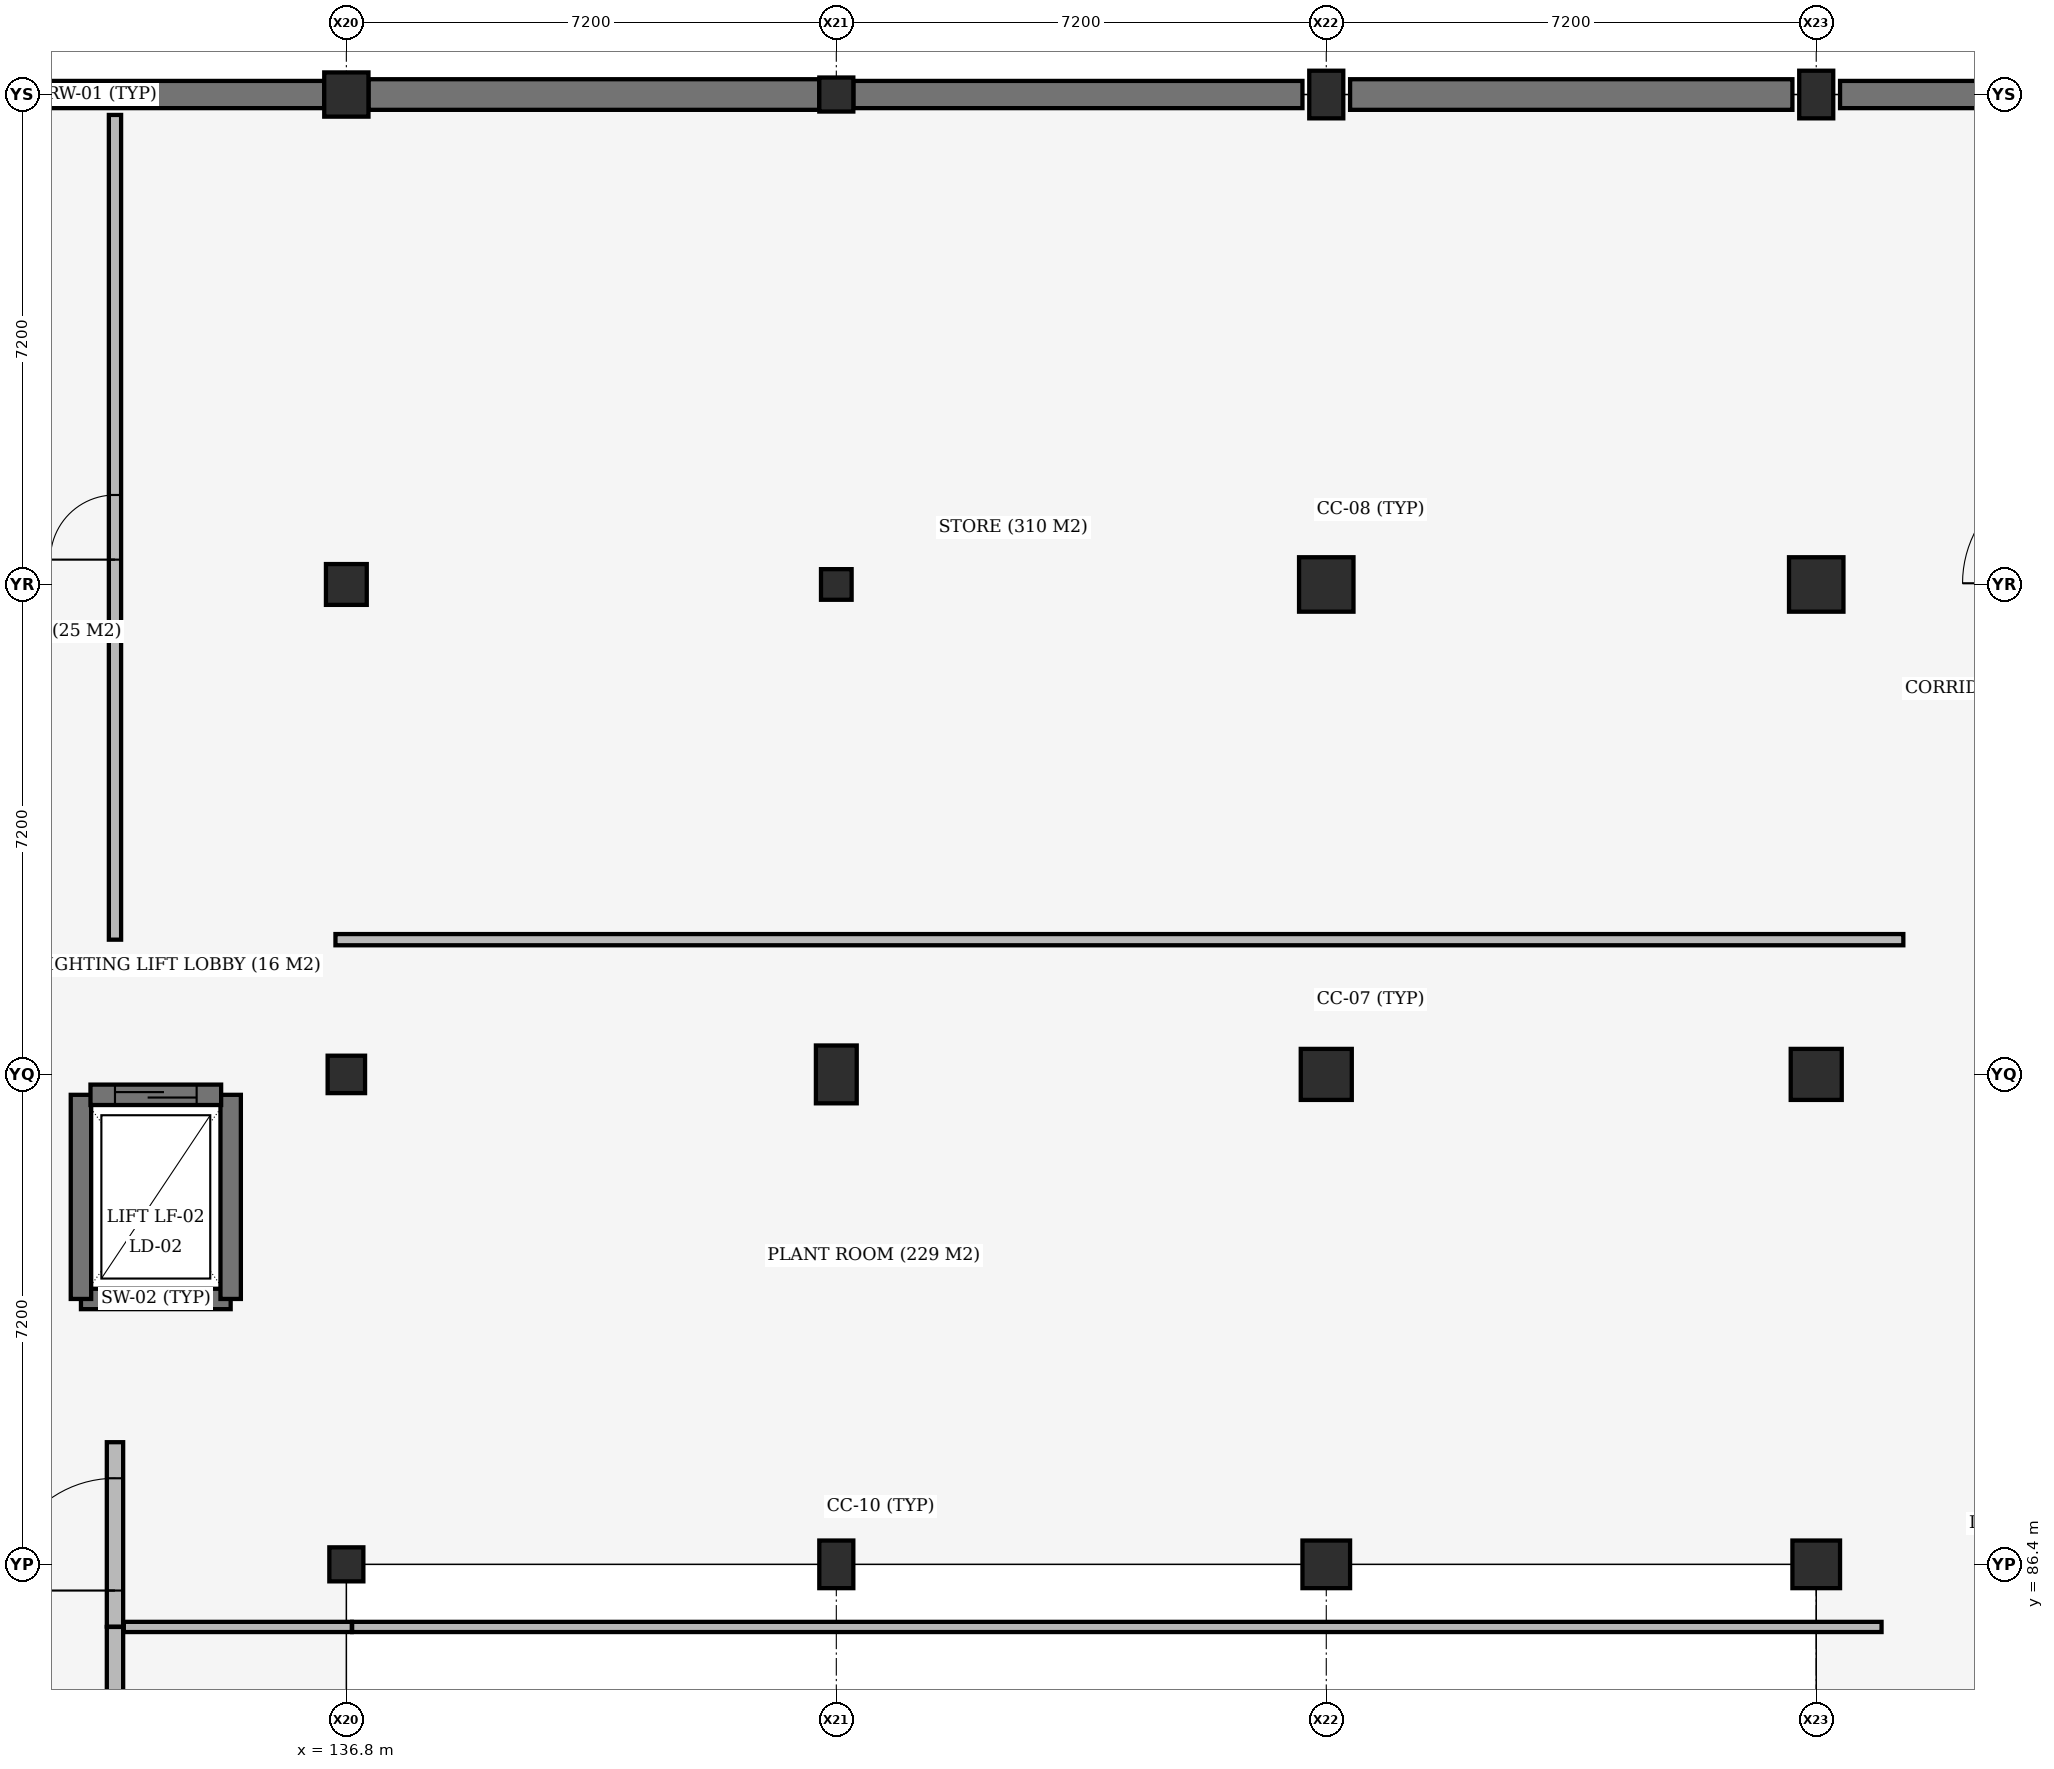
"""IFC4 building model, lengths in metres.
Left out: names, types, materials, properties, quantities, classifications, styles, units other than length and angle.
Written with IfcOpenShell. Run it as: python <this file> out.ifc"""

import sys

from ifc_helpers import new_model, si_unit, direction, frame, frame_2d, origin, origin_2d, place, context, subcontext, project, spatial, rectangle, extrude, element, fill, save


model = new_model("IFC4")
c1 = context("Model", 3, precision=1e-05, world=origin(), true_north=direction((0.0, 1.0)))
c2 = subcontext(c1, "Body", "Model", "MODEL_VIEW")
j1 = project(units=[si_unit("LENGTHUNIT", "METRE"), si_unit("PLANEANGLEUNIT", "RADIAN")], contexts=[c1])
p1 = place(None, origin())
s1 = spatial("IfcSite", under=j1, at=p1, CompositionType="ELEMENT")
p2 = place(p1, origin())
s2 = spatial("IfcBuilding", under=s1, at=p2, CompositionType="ELEMENT")
p3 = place(p2, frame((0.0, 0.0, -4.5)))
s3 = spatial("IfcBuildingStorey", under=s2, at=p3, CompositionType="ELEMENT", Elevation=-4.5)
p4 = place(p3, frame((136.8, 86.4, -0.42), z_axis=(0.0, 0.0, 1.0), x_axis=(1.0, 0.0, 0.0)))
e1 = element("IfcColumn", 1, at=p4, inside=s3, PredefinedType="COLUMN", context=c2, shape_type="SweptSolid", body=[
    extrude(rectangle(XDim=0.5, YDim=0.5, at=origin_2d()), origin(), (0.0, 0.0, 1.0), 4.6),
])
p5 = place(p3, frame((136.8, 93.6, -0.42), z_axis=(0.0, 0.0, 1.0), x_axis=(1.0, 0.0, 0.0)))
e2 = element("IfcColumn", 2, at=p5, inside=s3, PredefinedType="COLUMN", context=c2, shape_type="SweptSolid", body=[
    extrude(rectangle(XDim=0.55, YDim=0.55, at=origin_2d()), origin(), (0.0, 0.0, 1.0), 4.6),
])
p6 = place(p3, frame((136.8, 100.8, -0.42), z_axis=(0.0, 0.0, 1.0), x_axis=(1.0, 0.0, 0.0)))
e3 = element("IfcColumn", 3, at=p6, inside=s3, PredefinedType="COLUMN", context=c2, shape_type="SweptSolid", body=[
    extrude(rectangle(XDim=0.6, YDim=0.6, at=origin_2d()), origin(), (0.0, 0.0, 1.0), 4.6),
])
p7 = place(p3, frame((136.8, 108.0, -0.42), z_axis=(0.0, 0.0, 1.0), x_axis=(1.0, 0.0, 0.0)))
e4 = element("IfcColumn", 4, at=p7, inside=s3, PredefinedType="COLUMN", context=c2, shape_type="SweptSolid", body=[
    extrude(rectangle(XDim=0.65, YDim=0.65, at=origin_2d()), origin(), (0.0, 0.0, 1.0), 4.6),
])
p8 = place(p3, frame((144.0, 86.4, -0.42), z_axis=(0.0, 0.0, 1.0), x_axis=(1.0, 0.0, 0.0)))
e5 = element("IfcColumn", 5, at=p8, inside=s3, PredefinedType="COLUMN", context=c2, shape_type="SweptSolid", body=[
    extrude(rectangle(XDim=0.5, YDim=0.7, at=origin_2d()), origin(), (0.0, 0.0, 1.0), 4.6),
])
p9 = place(p3, frame((144.0, 93.6, -0.42), z_axis=(0.0, 0.0, 1.0), x_axis=(1.0, 0.0, 0.0)))
e6 = element("IfcColumn", 6, at=p9, inside=s3, PredefinedType="COLUMN", context=c2, shape_type="SweptSolid", body=[
    extrude(rectangle(XDim=0.6, YDim=0.85, at=origin_2d()), origin(), (0.0, 0.0, 1.0), 4.6),
])
p10 = place(p3, frame((144.0, 100.8, -0.42), z_axis=(0.0, 0.0, 1.0), x_axis=(1.0, 0.0, 0.0)))
e7 = element("IfcColumn", 7, at=p10, inside=s3, PredefinedType="COLUMN", context=c2, shape_type="SweptSolid", body=[
    extrude(rectangle(XDim=0.45, YDim=0.45, at=origin_2d()), origin(), (0.0, 0.0, 1.0), 4.6),
])
p11 = place(p3, frame((144.0, 108.0, -0.42), z_axis=(0.0, 0.0, 1.0), x_axis=(1.0, 0.0, 0.0)))
e8 = element("IfcColumn", 8, at=p11, inside=s3, PredefinedType="COLUMN", context=c2, shape_type="SweptSolid", body=[
    extrude(rectangle(XDim=0.5, YDim=0.5, at=origin_2d()), origin(), (0.0, 0.0, 1.0), 4.6),
])
p12 = place(p3, frame((151.2, 86.4, -0.42), z_axis=(0.0, 0.0, 1.0), x_axis=(1.0, 0.0, 0.0)))
e9 = element("IfcColumn", 9, at=p12, inside=s3, PredefinedType="COLUMN", context=c2, shape_type="SweptSolid", body=[
    extrude(rectangle(XDim=0.7, YDim=0.7, at=origin_2d()), origin(), (0.0, 0.0, 1.0), 4.6),
])
p13 = place(p3, frame((151.2, 93.6, -0.42), z_axis=(0.0, 0.0, 1.0), x_axis=(1.0, 0.0, 0.0)))
e10 = element("IfcColumn", 10, at=p13, inside=s3, PredefinedType="COLUMN", context=c2, shape_type="SweptSolid", body=[
    extrude(rectangle(XDim=0.75, YDim=0.75, at=origin_2d()), origin(), (0.0, 0.0, 1.0), 4.6),
])
p14 = place(p3, frame((151.2, 100.8, -0.42), z_axis=(0.0, 0.0, 1.0), x_axis=(1.0, 0.0, 0.0)))
e11 = element("IfcColumn", 11, at=p14, inside=s3, PredefinedType="COLUMN", context=c2, shape_type="SweptSolid", body=[
    extrude(rectangle(XDim=0.8, YDim=0.8, at=origin_2d()), origin(), (0.0, 0.0, 1.0), 4.6),
])
p15 = place(p3, frame((151.2, 108.0, -0.42), z_axis=(0.0, 0.0, 1.0), x_axis=(1.0, 0.0, 0.0)))
e12 = element("IfcColumn", 12, at=p15, inside=s3, PredefinedType="COLUMN", context=c2, shape_type="SweptSolid", body=[
    extrude(rectangle(XDim=0.5, YDim=0.7, at=origin_2d()), origin(), (0.0, 0.0, 1.0), 4.6),
])
p16 = place(p3, frame((158.4, 86.4, -0.42), z_axis=(0.0, 0.0, 1.0), x_axis=(1.0, 0.0, 0.0)))
e13 = element("IfcColumn", 13, at=p16, inside=s3, PredefinedType="COLUMN", context=c2, shape_type="SweptSolid", body=[
    extrude(rectangle(XDim=0.7, YDim=0.7, at=origin_2d()), origin(), (0.0, 0.0, 1.0), 4.6),
])
p17 = place(p3, frame((158.4, 93.6, -0.42), z_axis=(0.0, 0.0, 1.0), x_axis=(1.0, 0.0, 0.0)))
e14 = element("IfcColumn", 14, at=p17, inside=s3, PredefinedType="COLUMN", context=c2, shape_type="SweptSolid", body=[
    extrude(rectangle(XDim=0.75, YDim=0.75, at=origin_2d()), origin(), (0.0, 0.0, 1.0), 4.6),
])
p18 = place(p3, frame((158.4, 100.8, -0.42), z_axis=(0.0, 0.0, 1.0), x_axis=(1.0, 0.0, 0.0)))
e15 = element("IfcColumn", 15, at=p18, inside=s3, PredefinedType="COLUMN", context=c2, shape_type="SweptSolid", body=[
    extrude(rectangle(XDim=0.8, YDim=0.8, at=origin_2d()), origin(), (0.0, 0.0, 1.0), 4.6),
])
p19 = place(p3, frame((158.4, 108.0, -0.42), z_axis=(0.0, 0.0, 1.0), x_axis=(1.0, 0.0, 0.0)))
e16 = element("IfcColumn", 16, at=p19, inside=s3, PredefinedType="COLUMN", context=c2, shape_type="SweptSolid", body=[
    extrude(rectangle(XDim=0.5, YDim=0.7, at=origin_2d()), origin(), (0.0, 0.0, 1.0), 4.6),
])
p20 = place(p3, frame((132.9, 90.3, 0.0), z_axis=(0.0, 0.0, 1.0), x_axis=(1.0, 0.0, 0.0)))
e17 = element("IfcWall", 17, at=p20, inside=s3, PredefinedType="SHEAR", context=c2, shape_type="SweptSolid", body=[
    extrude(rectangle(XDim=2.2, YDim=0.3, at=frame_2d((1.1, 0.0))), origin(), (0.0, 0.0, 1.0), 4.18),
])
for number, where, z_axis, x_axis in (
    (18, (132.9, 93.3, 0.0), (0.0, 0.0, 1.0), (0.0, -1.0, 0.0)),
    (19, (135.1, 90.3, 0.0), (0.0, 0.0, 1.0), (0.0, 1.0, 0.0)),
):
    element("IfcWall", number, at=place(p3, frame(where, z_axis=z_axis, x_axis=x_axis)), inside=s3, PredefinedType="SHEAR", context=c2, shape_type="SweptSolid", body=[
        extrude(rectangle(XDim=3.0, YDim=0.3, at=frame_2d((1.5, 0.0))), origin(), (0.0, 0.0, 1.0), 4.18),
    ])
p21 = place(p3, frame((129.925, 108.0, 0.0), z_axis=(0.0, 0.0, 1.0), x_axis=(1.0, 0.0, 0.0)))
e20 = element("IfcWall", 20, at=p21, inside=s3, PredefinedType="USERDEFINED", context=c2, shape_type="SweptSolid", body=[
    extrude(rectangle(XDim=6.55, YDim=0.4, at=frame_2d((3.275, 0.0))), origin(), (0.0, 0.0, 1.0), 4.18),
])
p22 = place(p3, frame((137.125, 108.0, 0.0), z_axis=(0.0, 0.0, 1.0), x_axis=(1.0, 0.0, 0.0)))
e21 = element("IfcWall", 21, at=p22, inside=s3, PredefinedType="USERDEFINED", context=c2, shape_type="SweptSolid", body=[
    extrude(rectangle(XDim=6.625, YDim=0.45, at=frame_2d((3.312, 0.0))), origin(), (0.0, 0.0, 1.0), 4.18),
])
p23 = place(p3, frame((144.25, 108.0, 0.0), z_axis=(0.0, 0.0, 1.0), x_axis=(1.0, 0.0, 0.0)))
e22 = element("IfcWall", 22, at=p23, inside=s3, PredefinedType="USERDEFINED", context=c2, shape_type="SweptSolid", body=[
    extrude(rectangle(XDim=6.6, YDim=0.4, at=frame_2d((3.3, 0.0))), origin(), (0.0, 0.0, 1.0), 4.18),
])
p24 = place(p3, frame((151.55, 108.0, 0.0), z_axis=(0.0, 0.0, 1.0), x_axis=(1.0, 0.0, 0.0)))
e23 = element("IfcWall", 23, at=p24, inside=s3, PredefinedType="USERDEFINED", context=c2, shape_type="SweptSolid", body=[
    extrude(rectangle(XDim=6.5, YDim=0.45, at=frame_2d((3.25, 0.0))), origin(), (0.0, 0.0, 1.0), 4.18),
])
p25 = place(p3, frame((158.75, 108.0, 0.0), z_axis=(0.0, 0.0, 1.0), x_axis=(1.0, 0.0, 0.0)))
e24 = element("IfcWall", 24, at=p25, inside=s3, PredefinedType="USERDEFINED", context=c2, shape_type="SweptSolid", body=[
    extrude(rectangle(XDim=6.5, YDim=0.4, at=frame_2d((3.25, 0.0))), origin(), (0.0, 0.0, 1.0), 4.18),
])
p26 = place(p3, frame((133.04, 93.3, 0.0), z_axis=(0.0, 0.0, 1.0), x_axis=(1.0, 0.0, 0.0)))
e25 = element("IfcWall", 25, at=p26, inside=s3, PredefinedType="SHEAR", context=c2, shape_type="SweptSolid", body=[
    extrude(rectangle(XDim=1.92, YDim=0.3, at=frame_2d((0.96, 0.0))), origin(), (0.0, 0.0, 1.0), 4.18),
])
p27 = place(p26, frame((0.36, 0.0, 0.0)))
e26 = element("IfcOpeningElement", 26, at=p27, cuts=e25, PredefinedType="OPENING", context=c2, shape_type="SweptSolid", body=[
    extrude(rectangle(XDim=1.2, YDim=2.1, at=frame_2d((0.6, 1.05))), frame((0.0, 0.16, 0.0), z_axis=(0.0, -1.0, 0.0), x_axis=(1.0, 0.0, 0.0)), (0.0, 0.0, 1.0), 0.32),
])
p28 = place(p3, frame((133.4, 77.4, 0.0), z_axis=(0.0, 0.0, 1.0), x_axis=(0.0, 1.0, 0.0)))
e27 = element("IfcWall", 27, at=p28, inside=s3, PredefinedType="STANDARD", context=c2, shape_type="SweptSolid", body=[
    extrude(rectangle(XDim=8.08, YDim=0.24, at=frame_2d((4.04, 0.0))), origin(), (0.0, 0.0, 1.0), 3.53),
])
p29 = place(p28, frame((3.215, 0.0, 0.0)))
e28 = element("IfcOpeningElement", 28, at=p29, cuts=e27, PredefinedType="OPENING", context=c2, shape_type="SweptSolid", body=[
    extrude(rectangle(XDim=1.65, YDim=2.25, at=frame_2d((0.825, 1.125))), frame((0.0, 0.13, 0.0), z_axis=(0.0, -1.0, 0.0), x_axis=(1.0, 0.0, 0.0)), (0.0, 0.0, 1.0), 0.26),
])
p30 = place(p3, frame((133.53, 85.48, 0.0), z_axis=(0.0, 0.0, 1.0), x_axis=(1.0, 0.0, 0.0)))
e29 = element("IfcWall", 29, at=p30, inside=s3, PredefinedType="PARTITIONING", context=c2, shape_type="SweptSolid", body=[
    extrude(rectangle(XDim=3.35, YDim=0.15, at=frame_2d((1.675, 0.0))), origin(), (0.0, 0.0, 1.0), 3.38),
])
p31 = place(p3, frame((133.4, 85.485, 0.0), z_axis=(0.0, 0.0, 1.0), x_axis=(0.0, 1.0, 0.0)))
e30 = element("IfcWall", 30, at=p31, inside=s3, PredefinedType="STANDARD", context=c2, shape_type="SweptSolid", body=[
    extrude(rectangle(XDim=2.71, YDim=0.24, at=frame_2d((1.355, 0.0))), origin(), (0.0, 0.0, 1.0), 3.58),
])
p32 = place(p31, frame((0.53, 0.0, 0.0)))
e31 = element("IfcOpeningElement", 31, at=p32, cuts=e30, PredefinedType="OPENING", context=c2, shape_type="SweptSolid", body=[
    extrude(rectangle(XDim=1.65, YDim=2.25, at=frame_2d((0.825, 1.125))), frame((0.0, 0.13, 0.0), z_axis=(0.0, -1.0, 0.0), x_axis=(1.0, 0.0, 0.0)), (0.0, 0.0, 1.0), 0.26),
])
p33 = place(p3, frame((136.885, 85.48, 0.0), z_axis=(0.0, 0.0, 1.0), x_axis=(1.0, 0.0, 0.0)))
e32 = element("IfcWall", 32, at=p33, inside=s3, PredefinedType="PARTITIONING", context=c2, shape_type="SweptSolid", body=[
    extrude(rectangle(XDim=22.475, YDim=0.15, at=frame_2d((11.238, 0.0))), origin(), (0.0, 0.0, 1.0), 3.38),
])
p34 = place(p3, frame((136.64, 95.58, 0.0), z_axis=(0.0, 0.0, 1.0), x_axis=(1.0, 0.0, 0.0)))
e33 = element("IfcWall", 33, at=p34, inside=s3, PredefinedType="PARTITIONING", context=c2, shape_type="SweptSolid", body=[
    extrude(rectangle(XDim=23.04, YDim=0.165, at=frame_2d((11.52, 0.0))), origin(), (0.0, 0.0, 1.0), 3.53),
])
p35 = place(p3, frame((133.4, 95.58, 0.0), z_axis=(0.0, 0.0, 1.0), x_axis=(0.0, 1.0, 0.0)))
e34 = element("IfcWall", 34, at=p35, inside=s3, PredefinedType="PARTITIONING", context=c2, shape_type="SweptSolid", body=[
    extrude(rectangle(XDim=12.12, YDim=0.18, at=frame_2d((6.06, 0.0))), origin(), (0.0, 0.0, 1.0), 3.38),
])
p36 = place(p35, frame((5.585, 0.0, 0.0)))
e35 = element("IfcOpeningElement", 35, at=p36, cuts=e34, PredefinedType="OPENING", context=c2, shape_type="SweptSolid", body=[
    extrude(rectangle(XDim=0.95, YDim=2.15, at=frame_2d((0.475, 1.075))), frame((0.0, 0.1, 0.0), z_axis=(0.0, -1.0, 0.0), x_axis=(1.0, 0.0, 0.0)), (0.0, 0.0, 1.0), 0.2),
])
p37 = place(p27, origin())
e36 = element("IfcDoor", 36, at=p37, inside=s3, OperationType="SLIDING_TO_LEFT", PredefinedType="DOOR", context=c2, shape_type="SweptSolid", body=[
    extrude(rectangle(XDim=1.2, YDim=2.1, at=frame_2d((0.6, 1.05))), frame((0.0, 0.025, 0.0), z_axis=(0.0, -1.0, 0.0), x_axis=(1.0, 0.0, 0.0)), (0.0, 0.0, 1.0), 0.05),
])
fill(e26, e36)
p38 = place(p32, origin())
e37 = element("IfcDoor", 37, at=p38, inside=s3, OperationType="DOUBLE_DOOR_SINGLE_SWING", PredefinedType="DOOR", context=c2, shape_type="SweptSolid", body=[
    extrude(rectangle(XDim=1.65, YDim=2.25, at=frame_2d((0.825, 1.125))), frame((0.0, 0.025, 0.0), z_axis=(0.0, -1.0, 0.0), x_axis=(1.0, 0.0, 0.0)), (0.0, 0.0, 1.0), 0.05),
])
fill(e31, e37)
p39 = place(p36, origin())
e38 = element("IfcDoor", 38, at=p39, inside=s3, OperationType="SINGLE_SWING_LEFT", PredefinedType="DOOR", context=c2, shape_type="SweptSolid", body=[
    extrude(rectangle(XDim=0.95, YDim=2.15, at=frame_2d((0.475, 1.075))), frame((0.0, 0.025, 0.0), z_axis=(0.0, -1.0, 0.0), x_axis=(1.0, 0.0, 0.0)), (0.0, 0.0, 1.0), 0.05),
])
fill(e35, e38)
save(model, sys.argv[1])
